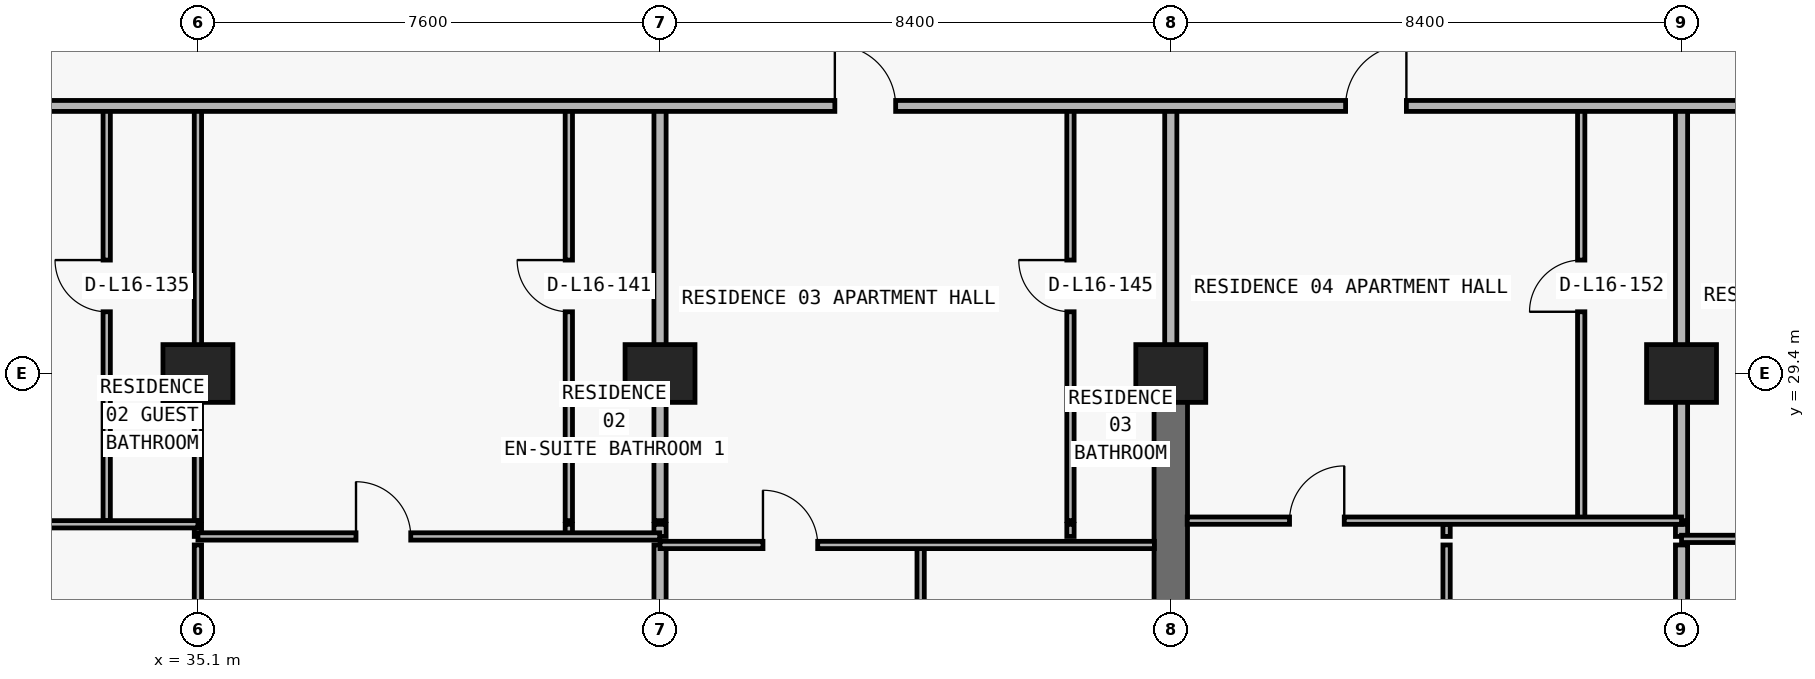
"""IFC4 building model, lengths in metres.
Left out: names, types, materials, properties, quantities, classifications, styles, units other than length and angle.
Written with IfcOpenShell. Run it as: python <this file> out.ifc"""

import sys

from ifc_helpers import new_model, si_unit, direction, frame, frame_2d, origin, origin_2d, place, context, subcontext, project, spatial, rectangle, extrude, element, fill, save


model = new_model("IFC4")
c1 = context("Model", 3, precision=1e-05, world=origin(), true_north=direction((0.0, 1.0)))
c2 = subcontext(c1, "Body", "Model", "MODEL_VIEW")
j1 = project(units=[si_unit("LENGTHUNIT", "METRE"), si_unit("PLANEANGLEUNIT", "RADIAN")], contexts=[c1])
p1 = place(None, origin())
s1 = spatial("IfcSite", under=j1, at=p1, CompositionType="ELEMENT")
p2 = place(p1, origin())
s2 = spatial("IfcBuilding", under=s1, at=p2, CompositionType="ELEMENT")
p3 = place(p2, frame((0.0, 0.0, 63.0)))
s3 = spatial("IfcBuildingStorey", under=s2, at=p3, CompositionType="ELEMENT", Elevation=63.0)
for number, where, z_axis, x_axis in (
    (1, (35.1, 29.4, 0.0), (0.0, 0.0, 1.0), (1.0, 0.0, 0.0)),
    (2, (42.7, 29.4, 0.0), (0.0, 0.0, 1.0), (1.0, 0.0, 0.0)),
    (3, (51.1, 29.4, 0.0), (0.0, 0.0, 1.0), (1.0, 0.0, 0.0)),
    (4, (59.5, 29.4, 0.0), (0.0, 0.0, 1.0), (1.0, 0.0, 0.0)),
):
    element("IfcColumn", number, at=place(p3, frame(where, z_axis=z_axis, x_axis=x_axis)), inside=s3, PredefinedType="COLUMN", context=c2, shape_type="SweptSolid", body=[
        extrude(rectangle(XDim=1.15, YDim=0.95, at=origin_2d()), origin(), (0.0, 0.0, 1.0), 3.05),
    ])
p4 = place(p3, frame((51.1, 20.8, 0.0), z_axis=(0.0, 0.0, 1.0), x_axis=(0.0, 1.0, 0.0)))
e5 = element("IfcWall", 5, at=p4, inside=s3, PredefinedType="SHEAR", context=c2, shape_type="SweptSolid", body=[
    extrude(rectangle(XDim=8.6, YDim=0.55, at=frame_2d((4.3, 0.0))), origin(), (0.0, 0.0, 1.0), 3.05),
])
p5 = place(p3, frame((33.6, 26.98, 0.0), z_axis=(0.0, 0.0, 1.0), x_axis=(0.0, 1.0, 0.0)))
e6 = element("IfcWall", 6, at=p5, inside=s3, PredefinedType="PARTITIONING", context=c2, shape_type="SweptSolid", body=[
    extrude(rectangle(XDim=6.82, YDim=0.12, at=frame_2d((3.41, 0.0))), origin(), (0.0, 0.0, 1.0), 3.05),
])
p6 = place(p5, frame((3.435, 0.0, 0.0)))
e7 = element("IfcOpeningElement", 7, at=p6, cuts=e6, PredefinedType="OPENING", context=c2, shape_type="SweptSolid", body=[
    extrude(rectangle(XDim=0.85, YDim=2.1, at=frame_2d((0.425, 1.05))), frame((0.0, 0.07, 0.0), z_axis=(0.0, -1.0, 0.0), x_axis=(1.0, 0.0, 0.0)), (0.0, 0.0, 1.0), 0.14),
])
p7 = place(p3, frame((35.1, 22.2, 0.0), z_axis=(0.0, 0.0, 1.0), x_axis=(0.0, 1.0, 0.0)))
e8 = element("IfcWall", 8, at=p7, inside=s3, PredefinedType="PARTITIONING", context=c2, shape_type="SweptSolid", body=[
    extrude(rectangle(XDim=4.38, YDim=0.12, at=frame_2d((2.19, 0.0))), origin(), (0.0, 0.0, 1.0), 2.11),
])
p8 = place(p7, frame((1.8, 0.0, 0.0)))
e9 = element("IfcOpeningElement", 9, at=p8, cuts=e8, PredefinedType="OPENING", context=c2, shape_type="SweptSolid", body=[
    extrude(rectangle(XDim=0.9, YDim=2.06, at=frame_2d((0.45, 1.03))), frame((0.0, 0.07, 0.0), z_axis=(0.0, -1.0, 0.0), x_axis=(1.0, 0.0, 0.0)), (0.0, 0.0, 1.0), 0.14),
])
p9 = place(p3, frame((35.1, 26.72, 0.0), z_axis=(0.0, 0.0, 1.0), x_axis=(0.0, 1.0, 0.0)))
e10 = element("IfcWall", 10, at=p9, inside=s3, PredefinedType="PARTITIONING", context=c2, shape_type="SweptSolid", body=[
    extrude(rectangle(XDim=0.2, YDim=0.12, at=frame_2d((0.1, 0.0))), origin(), (0.0, 0.0, 1.0), 2.11),
])
p10 = place(p3, frame((35.1, 26.98, 0.0), z_axis=(0.0, 0.0, 1.0), x_axis=(0.0, 1.0, 0.0)))
e11 = element("IfcWall", 11, at=p10, inside=s3, PredefinedType="PARTITIONING", context=c2, shape_type="SweptSolid", body=[
    extrude(rectangle(XDim=6.82, YDim=0.12, at=frame_2d((3.41, 0.0))), origin(), (0.0, 0.0, 1.0), 2.11),
])
p11 = place(p3, frame((41.2, 26.72, 0.0), z_axis=(0.0, 0.0, 1.0), x_axis=(0.0, 1.0, 0.0)))
e12 = element("IfcWall", 12, at=p11, inside=s3, PredefinedType="PARTITIONING", context=c2, shape_type="SweptSolid", body=[
    extrude(rectangle(XDim=0.2, YDim=0.12, at=frame_2d((0.1, 0.0))), origin(), (0.0, 0.0, 1.0), 3.05),
])
p12 = place(p3, frame((41.2, 26.98, 0.0), z_axis=(0.0, 0.0, 1.0), x_axis=(0.0, 1.0, 0.0)))
e13 = element("IfcWall", 13, at=p12, inside=s3, PredefinedType="PARTITIONING", context=c2, shape_type="SweptSolid", body=[
    extrude(rectangle(XDim=6.82, YDim=0.12, at=frame_2d((3.41, 0.0))), origin(), (0.0, 0.0, 1.0), 3.05),
])
p13 = place(p12, frame((3.435, 0.0, 0.0)))
e14 = element("IfcOpeningElement", 14, at=p13, cuts=e13, PredefinedType="OPENING", context=c2, shape_type="SweptSolid", body=[
    extrude(rectangle(XDim=0.85, YDim=2.1, at=frame_2d((0.425, 1.05))), frame((0.0, 0.07, 0.0), z_axis=(0.0, -1.0, 0.0), x_axis=(1.0, 0.0, 0.0)), (0.0, 0.0, 1.0), 0.14),
])
p14 = place(p3, frame((42.7, 22.2, 0.0), z_axis=(0.0, 0.0, 1.0), x_axis=(0.0, 1.0, 0.0)))
e15 = element("IfcWall", 15, at=p14, inside=s3, PredefinedType="PARTITIONING", context=c2, shape_type="SweptSolid", body=[
    extrude(rectangle(XDim=4.38, YDim=0.2, at=frame_2d((2.19, 0.0))), origin(), (0.0, 0.0, 1.0), 2.11),
])
p15 = place(p3, frame((42.7, 26.72, 0.0), z_axis=(0.0, 0.0, 1.0), x_axis=(0.0, 1.0, 0.0)))
e16 = element("IfcWall", 16, at=p15, inside=s3, PredefinedType="PARTITIONING", context=c2, shape_type="SweptSolid", body=[
    extrude(rectangle(XDim=0.2, YDim=0.2, at=frame_2d((0.1, 0.0))), origin(), (0.0, 0.0, 1.0), 2.11),
])
p16 = place(p3, frame((42.7, 26.98, 0.0), z_axis=(0.0, 0.0, 1.0), x_axis=(0.0, 1.0, 0.0)))
e17 = element("IfcWall", 17, at=p16, inside=s3, PredefinedType="PARTITIONING", context=c2, shape_type="SweptSolid", body=[
    extrude(rectangle(XDim=6.82, YDim=0.2, at=frame_2d((3.41, 0.0))), origin(), (0.0, 0.0, 1.0), 2.11),
])
p17 = place(p3, frame((46.986, 22.2, 0.0), z_axis=(0.0, 0.0, 1.0), x_axis=(0.0, 1.0, 0.0)))
e18 = element("IfcWall", 18, at=p17, inside=s3, PredefinedType="PARTITIONING", context=c2, shape_type="SweptSolid", body=[
    extrude(rectangle(XDim=4.38, YDim=0.12, at=frame_2d((2.19, 0.0))), origin(), (0.0, 0.0, 1.0), 3.05),
])
p18 = place(p17, frame((1.74, 0.0, 0.0)))
e19 = element("IfcOpeningElement", 19, at=p18, cuts=e18, PredefinedType="OPENING", context=c2, shape_type="SweptSolid", body=[
    extrude(rectangle(XDim=0.9, YDim=2.15, at=frame_2d((0.45, 1.075))), frame((0.0, 0.07, 0.0), z_axis=(0.0, -1.0, 0.0), x_axis=(1.0, 0.0, 0.0)), (0.0, 0.0, 1.0), 0.14),
])
p19 = place(p3, frame((49.45, 26.72, 0.0), z_axis=(0.0, 0.0, 1.0), x_axis=(0.0, 1.0, 0.0)))
e20 = element("IfcWall", 20, at=p19, inside=s3, PredefinedType="PARTITIONING", context=c2, shape_type="SweptSolid", body=[
    extrude(rectangle(XDim=0.2, YDim=0.12, at=frame_2d((0.1, 0.0))), origin(), (0.0, 0.0, 1.0), 3.05),
])
p20 = place(p3, frame((49.45, 26.98, 0.0), z_axis=(0.0, 0.0, 1.0), x_axis=(0.0, 1.0, 0.0)))
e21 = element("IfcWall", 21, at=p20, inside=s3, PredefinedType="PARTITIONING", context=c2, shape_type="SweptSolid", body=[
    extrude(rectangle(XDim=6.82, YDim=0.12, at=frame_2d((3.41, 0.0))), origin(), (0.0, 0.0, 1.0), 3.05),
])
p21 = place(p20, frame((3.435, 0.0, 0.0)))
e22 = element("IfcOpeningElement", 22, at=p21, cuts=e21, PredefinedType="OPENING", context=c2, shape_type="SweptSolid", body=[
    extrude(rectangle(XDim=0.85, YDim=2.1, at=frame_2d((0.425, 1.05))), frame((0.0, 0.07, 0.0), z_axis=(0.0, -1.0, 0.0), x_axis=(1.0, 0.0, 0.0)), (0.0, 0.0, 1.0), 0.14),
])
p22 = place(p3, frame((51.1, 29.405, 0.0), z_axis=(0.0, 0.0, 1.0), x_axis=(0.0, 1.0, 0.0)))
e23 = element("IfcWall", 23, at=p22, inside=s3, PredefinedType="PARTITIONING", context=c2, shape_type="SweptSolid", body=[
    extrude(rectangle(XDim=4.395, YDim=0.2, at=frame_2d((2.198, 0.0))), origin(), (0.0, 0.0, 1.0), 2.335),
])
p23 = place(p3, frame((55.636, 22.2, 0.0), z_axis=(0.0, 0.0, 1.0), x_axis=(0.0, 1.0, 0.0)))
e24 = element("IfcWall", 24, at=p23, inside=s3, PredefinedType="PARTITIONING", context=c2, shape_type="SweptSolid", body=[
    extrude(rectangle(XDim=4.38, YDim=0.12, at=frame_2d((2.19, 0.0))), origin(), (0.0, 0.0, 1.0), 3.05),
])
p24 = place(p23, frame((1.74, 0.0, 0.0)))
e25 = element("IfcOpeningElement", 25, at=p24, cuts=e24, PredefinedType="OPENING", context=c2, shape_type="SweptSolid", body=[
    extrude(rectangle(XDim=0.9, YDim=2.15, at=frame_2d((0.45, 1.075))), frame((0.0, 0.07, 0.0), z_axis=(0.0, -1.0, 0.0), x_axis=(1.0, 0.0, 0.0)), (0.0, 0.0, 1.0), 0.14),
])
p25 = place(p3, frame((55.636, 26.72, 0.0), z_axis=(0.0, 0.0, 1.0), x_axis=(0.0, 1.0, 0.0)))
e26 = element("IfcWall", 26, at=p25, inside=s3, PredefinedType="PARTITIONING", context=c2, shape_type="SweptSolid", body=[
    extrude(rectangle(XDim=0.2, YDim=0.12, at=frame_2d((0.1, 0.0))), origin(), (0.0, 0.0, 1.0), 3.05),
])
p26 = place(p3, frame((57.85, 26.98, 0.0), z_axis=(0.0, 0.0, 1.0), x_axis=(0.0, 1.0, 0.0)))
e27 = element("IfcWall", 27, at=p26, inside=s3, PredefinedType="PARTITIONING", context=c2, shape_type="SweptSolid", body=[
    extrude(rectangle(XDim=6.82, YDim=0.12, at=frame_2d((3.41, 0.0))), origin(), (0.0, 0.0, 1.0), 3.05),
])
p27 = place(p26, frame((3.435, 0.0, 0.0)))
e28 = element("IfcOpeningElement", 28, at=p27, cuts=e27, PredefinedType="OPENING", context=c2, shape_type="SweptSolid", body=[
    extrude(rectangle(XDim=0.85, YDim=2.1, at=frame_2d((0.425, 1.05))), frame((0.0, 0.07, 0.0), z_axis=(0.0, -1.0, 0.0), x_axis=(1.0, 0.0, 0.0)), (0.0, 0.0, 1.0), 0.14),
])
p28 = place(p3, frame((59.5, 22.2, 0.0), z_axis=(0.0, 0.0, 1.0), x_axis=(0.0, 1.0, 0.0)))
e29 = element("IfcWall", 29, at=p28, inside=s3, PredefinedType="PARTITIONING", context=c2, shape_type="SweptSolid", body=[
    extrude(rectangle(XDim=4.38, YDim=0.2, at=frame_2d((2.19, 0.0))), origin(), (0.0, 0.0, 1.0), 2.11),
])
p29 = place(p3, frame((59.5, 26.72, 0.0), z_axis=(0.0, 0.0, 1.0), x_axis=(0.0, 1.0, 0.0)))
e30 = element("IfcWall", 30, at=p29, inside=s3, PredefinedType="PARTITIONING", context=c2, shape_type="SweptSolid", body=[
    extrude(rectangle(XDim=0.2, YDim=0.2, at=frame_2d((0.1, 0.0))), origin(), (0.0, 0.0, 1.0), 2.11),
])
p30 = place(p3, frame((59.5, 26.98, 0.0), z_axis=(0.0, 0.0, 1.0), x_axis=(0.0, 1.0, 0.0)))
e31 = element("IfcWall", 31, at=p30, inside=s3, PredefinedType="PARTITIONING", context=c2, shape_type="SweptSolid", body=[
    extrude(rectangle(XDim=6.82, YDim=0.2, at=frame_2d((3.41, 0.0))), origin(), (0.0, 0.0, 1.0), 2.11),
])
p31 = place(p3, frame((42.7, 26.58, 0.0), z_axis=(0.0, 0.0, 1.0), x_axis=(1.0, 0.0, 0.0)))
e32 = element("IfcWall", 32, at=p31, inside=s3, PredefinedType="PARTITIONING", context=c2, shape_type="SweptSolid", body=[
    extrude(rectangle(XDim=8.13, YDim=0.12, at=frame_2d((4.065, 0.0))), origin(), (0.0, 0.0, 1.0), 3.05),
])
p32 = place(p31, frame((1.693, 0.0, 0.0)))
e33 = element("IfcOpeningElement", 33, at=p32, cuts=e32, PredefinedType="OPENING", context=c2, shape_type="SweptSolid", body=[
    extrude(rectangle(XDim=0.9, YDim=2.15, at=frame_2d((0.45, 1.075))), frame((0.0, 0.07, 0.0), z_axis=(0.0, -1.0, 0.0), x_axis=(1.0, 0.0, 0.0)), (0.0, 0.0, 1.0), 0.14),
])
p33 = place(p3, frame((59.5, 26.68, 0.0), z_axis=(0.0, 0.0, 1.0), x_axis=(1.0, 0.0, 0.0)))
e34 = element("IfcWall", 34, at=p33, inside=s3, PredefinedType="PARTITIONING", context=c2, shape_type="SweptSolid", body=[
    extrude(rectangle(XDim=8.4, YDim=0.12, at=frame_2d((4.2, 0.0))), origin(), (0.0, 0.0, 1.0), 3.05),
])
p34 = place(p33, frame((1.943, 0.0, 0.0)))
e35 = element("IfcOpeningElement", 35, at=p34, cuts=e34, PredefinedType="OPENING", context=c2, shape_type="SweptSolid", body=[
    extrude(rectangle(XDim=0.9, YDim=2.15, at=frame_2d((0.45, 1.075))), frame((0.0, 0.07, 0.0), z_axis=(0.0, -1.0, 0.0), x_axis=(1.0, 0.0, 0.0)), (0.0, 0.0, 1.0), 0.14),
])
p35 = place(p3, frame((35.1, 26.72, 0.0), z_axis=(0.0, 0.0, 1.0), x_axis=(1.0, 0.0, 0.0)))
e36 = element("IfcWall", 36, at=p35, inside=s3, PredefinedType="PARTITIONING", context=c2, shape_type="SweptSolid", body=[
    extrude(rectangle(XDim=7.595, YDim=0.12, at=frame_2d((3.797, 0.0))), origin(), (0.0, 0.0, 1.0), 3.05),
])
p36 = place(p35, frame((2.6, 0.0, 0.0)))
e37 = element("IfcOpeningElement", 37, at=p36, cuts=e36, PredefinedType="OPENING", context=c2, shape_type="SweptSolid", body=[
    extrude(rectangle(XDim=0.9, YDim=2.15, at=frame_2d((0.45, 1.075))), frame((0.0, 0.07, 0.0), z_axis=(0.0, -1.0, 0.0), x_axis=(1.0, 0.0, 0.0)), (0.0, 0.0, 1.0), 0.14),
])
p37 = place(p3, frame((26.97, 26.92, 0.0), z_axis=(0.0, 0.0, 1.0), x_axis=(1.0, 0.0, 0.0)))
e38 = element("IfcWall", 38, at=p37, inside=s3, PredefinedType="PARTITIONING", context=c2, shape_type="SweptSolid", body=[
    extrude(rectangle(XDim=8.13, YDim=0.12, at=frame_2d((4.065, 0.0))), origin(), (0.0, 0.0, 1.0), 3.05),
])
p38 = place(p37, frame((1.179, 0.0, 0.0)))
e39 = element("IfcOpeningElement", 39, at=p38, cuts=e38, PredefinedType="OPENING", context=c2, shape_type="SweptSolid", body=[
    extrude(rectangle(XDim=0.9, YDim=2.15, at=frame_2d((0.45, 1.075))), frame((0.0, 0.07, 0.0), z_axis=(0.0, -1.0, 0.0), x_axis=(1.0, 0.0, 0.0)), (0.0, 0.0, 1.0), 0.14),
])
p39 = place(p3, frame((51.37, 26.98, 0.0), z_axis=(0.0, 0.0, 1.0), x_axis=(1.0, 0.0, 0.0)))
e40 = element("IfcWall", 40, at=p39, inside=s3, PredefinedType="PARTITIONING", context=c2, shape_type="SweptSolid", body=[
    extrude(rectangle(XDim=8.13, YDim=0.12, at=frame_2d((4.065, 0.0))), origin(), (0.0, 0.0, 1.0), 3.05),
])
p40 = place(p39, frame((1.683, 0.0, 0.0)))
e41 = element("IfcOpeningElement", 41, at=p40, cuts=e40, PredefinedType="OPENING", context=c2, shape_type="SweptSolid", body=[
    extrude(rectangle(XDim=0.9, YDim=2.15, at=frame_2d((0.45, 1.075))), frame((0.0, 0.07, 0.0), z_axis=(0.0, -1.0, 0.0), x_axis=(1.0, 0.0, 0.0)), (0.0, 0.0, 1.0), 0.14),
])
p41 = place(p3, frame((26.7, 33.8, 0.0), z_axis=(0.0, 0.0, 1.0), x_axis=(1.0, 0.0, 0.0)))
e42 = element("IfcWall", 42, at=p41, inside=s3, PredefinedType="PARTITIONING", context=c2, shape_type="SweptSolid", body=[
    extrude(rectangle(XDim=46.0, YDim=0.18, at=frame_2d((23.0, 0.0))), origin(), (0.0, 0.0, 1.0), 3.05),
])
p42 = place(p41, frame((2.95, 0.0, 0.0)))
e43 = element("IfcOpeningElement", 43, at=p42, cuts=e42, PredefinedType="OPENING", context=c2, shape_type="SweptSolid", body=[
    extrude(rectangle(XDim=1.0, YDim=2.2, at=frame_2d((0.5, 1.1))), frame((0.0, 0.1, 0.0), z_axis=(0.0, -1.0, 0.0), x_axis=(1.0, 0.0, 0.0)), (0.0, 0.0, 1.0), 0.2),
])
p43 = place(p41, frame((18.875, 0.0, 0.0)))
e44 = element("IfcOpeningElement", 44, at=p43, cuts=e42, PredefinedType="OPENING", context=c2, shape_type="SweptSolid", body=[
    extrude(rectangle(XDim=1.0, YDim=2.2, at=frame_2d((0.5, 1.1))), frame((0.0, 0.1, 0.0), z_axis=(0.0, -1.0, 0.0), x_axis=(1.0, 0.0, 0.0)), (0.0, 0.0, 1.0), 0.2),
])
p44 = place(p41, frame((27.275, 0.0, 0.0)))
e45 = element("IfcOpeningElement", 45, at=p44, cuts=e42, PredefinedType="OPENING", context=c2, shape_type="SweptSolid", body=[
    extrude(rectangle(XDim=1.0, YDim=2.2, at=frame_2d((0.5, 1.1))), frame((0.0, 0.1, 0.0), z_axis=(0.0, -1.0, 0.0), x_axis=(1.0, 0.0, 0.0)), (0.0, 0.0, 1.0), 0.2),
])
p45 = place(p41, frame((35.675, 0.0, 0.0)))
e46 = element("IfcOpeningElement", 46, at=p45, cuts=e42, PredefinedType="OPENING", context=c2, shape_type="SweptSolid", body=[
    extrude(rectangle(XDim=1.0, YDim=2.2, at=frame_2d((0.5, 1.1))), frame((0.0, 0.1, 0.0), z_axis=(0.0, -1.0, 0.0), x_axis=(1.0, 0.0, 0.0)), (0.0, 0.0, 1.0), 0.2),
])
p46 = place(p6, origin())
e47 = element("IfcDoor", 47, at=p46, inside=s3, OperationType="SINGLE_SWING_RIGHT", PredefinedType="DOOR", context=c2, shape_type="SweptSolid", body=[
    extrude(rectangle(XDim=0.85, YDim=2.1, at=frame_2d((0.425, 1.05))), frame((0.0, 0.025, 0.0), z_axis=(0.0, -1.0, 0.0), x_axis=(1.0, 0.0, 0.0)), (0.0, 0.0, 1.0), 0.05),
])
fill(e7, e47)
p47 = place(p36, origin())
e48 = element("IfcDoor", 48, at=p47, inside=s3, OperationType="SINGLE_SWING_LEFT", PredefinedType="DOOR", context=c2, shape_type="SweptSolid", body=[
    extrude(rectangle(XDim=0.9, YDim=2.15, at=frame_2d((0.45, 1.075))), frame((0.0, 0.025, 0.0), z_axis=(0.0, -1.0, 0.0), x_axis=(1.0, 0.0, 0.0)), (0.0, 0.0, 1.0), 0.05),
])
fill(e37, e48)
p48 = place(p13, origin())
e49 = element("IfcDoor", 49, at=p48, inside=s3, OperationType="SINGLE_SWING_RIGHT", PredefinedType="DOOR", context=c2, shape_type="SweptSolid", body=[
    extrude(rectangle(XDim=0.85, YDim=2.1, at=frame_2d((0.425, 1.05))), frame((0.0, 0.025, 0.0), z_axis=(0.0, -1.0, 0.0), x_axis=(1.0, 0.0, 0.0)), (0.0, 0.0, 1.0), 0.05),
])
fill(e14, e49)
p49 = place(p43, origin())
e50 = element("IfcDoor", 50, at=p49, inside=s3, OperationType="SINGLE_SWING_LEFT", PredefinedType="DOOR", context=c2, shape_type="SweptSolid", body=[
    extrude(rectangle(XDim=1.0, YDim=2.2, at=frame_2d((0.5, 1.1))), frame((0.0, 0.025, 0.0), z_axis=(0.0, -1.0, 0.0), x_axis=(1.0, 0.0, 0.0)), (0.0, 0.0, 1.0), 0.05),
])
fill(e44, e50)
p50 = place(p21, origin())
e51 = element("IfcDoor", 51, at=p50, inside=s3, OperationType="SINGLE_SWING_RIGHT", PredefinedType="DOOR", context=c2, shape_type="SweptSolid", body=[
    extrude(rectangle(XDim=0.85, YDim=2.1, at=frame_2d((0.425, 1.05))), frame((0.0, 0.025, 0.0), z_axis=(0.0, -1.0, 0.0), x_axis=(1.0, 0.0, 0.0)), (0.0, 0.0, 1.0), 0.05),
])
fill(e22, e51)
p51 = place(p32, origin())
e52 = element("IfcDoor", 52, at=p51, inside=s3, OperationType="SINGLE_SWING_LEFT", PredefinedType="DOOR", context=c2, shape_type="SweptSolid", body=[
    extrude(rectangle(XDim=0.9, YDim=2.15, at=frame_2d((0.45, 1.075))), frame((0.0, 0.025, 0.0), z_axis=(0.0, -1.0, 0.0), x_axis=(1.0, 0.0, 0.0)), (0.0, 0.0, 1.0), 0.05),
])
fill(e33, e52)
p52 = place(p44, origin())
e53 = element("IfcDoor", 53, at=p52, inside=s3, OperationType="SINGLE_SWING_RIGHT", PredefinedType="DOOR", context=c2, shape_type="SweptSolid", body=[
    extrude(rectangle(XDim=1.0, YDim=2.2, at=frame_2d((0.5, 1.1))), frame((0.0, 0.025, 0.0), z_axis=(0.0, -1.0, 0.0), x_axis=(1.0, 0.0, 0.0)), (0.0, 0.0, 1.0), 0.05),
])
fill(e45, e53)
p53 = place(p27, origin())
e54 = element("IfcDoor", 54, at=p53, inside=s3, OperationType="SINGLE_SWING_LEFT", PredefinedType="DOOR", context=c2, shape_type="SweptSolid", body=[
    extrude(rectangle(XDim=0.85, YDim=2.1, at=frame_2d((0.425, 1.05))), frame((0.0, 0.025, 0.0), z_axis=(0.0, -1.0, 0.0), x_axis=(1.0, 0.0, 0.0)), (0.0, 0.0, 1.0), 0.05),
])
fill(e28, e54)
p54 = place(p40, origin())
e55 = element("IfcDoor", 55, at=p54, inside=s3, OperationType="SINGLE_SWING_RIGHT", PredefinedType="DOOR", context=c2, shape_type="SweptSolid", body=[
    extrude(rectangle(XDim=0.9, YDim=2.15, at=frame_2d((0.45, 1.075))), frame((0.0, 0.025, 0.0), z_axis=(0.0, -1.0, 0.0), x_axis=(1.0, 0.0, 0.0)), (0.0, 0.0, 1.0), 0.05),
])
fill(e41, e55)
save(model, sys.argv[1])
